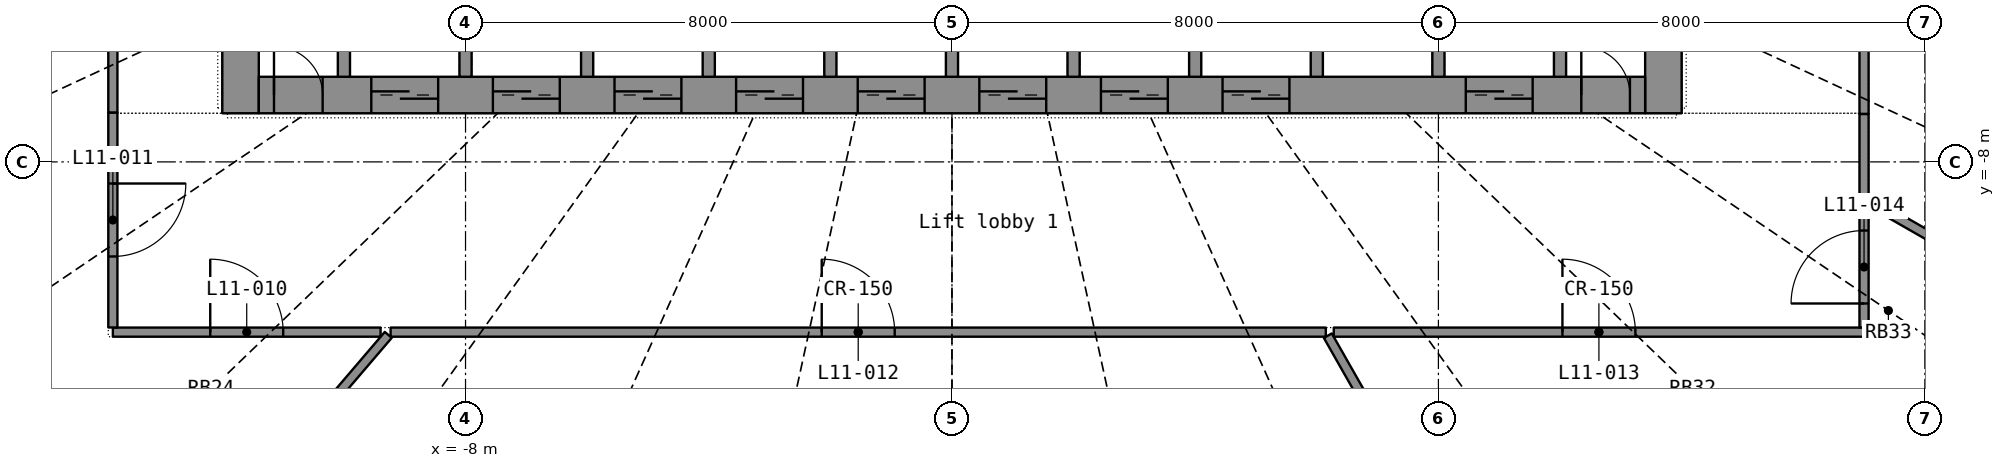
"""IFC4 building model, lengths in metres.
Left out: names, types, materials, properties, quantities, classifications, styles, units other than length and angle.
Written with IfcOpenShell. Run it as: python <this file> out.ifc"""

import sys

from ifc_helpers import new_model, si_unit, direction, frame, frame_2d, origin, place, context, subcontext, project, spatial, rectangle, extrude, element, fill, save


model = new_model("IFC4")
c1 = context("Model", 3, precision=1e-05, world=origin(), true_north=direction((0.0, 1.0)))
c2 = subcontext(c1, "Body", "Model", "MODEL_VIEW")
j1 = project(units=[si_unit("LENGTHUNIT", "METRE"), si_unit("PLANEANGLEUNIT", "RADIAN")], contexts=[c1])
p1 = place(None, origin())
s1 = spatial("IfcSite", under=j1, at=p1, CompositionType="ELEMENT")
p2 = place(p1, origin())
s2 = spatial("IfcBuilding", under=s1, at=p2, CompositionType="ELEMENT")
p3 = place(p2, frame((0.0, 0.0, 51.9)))
s3 = spatial("IfcBuildingStorey", under=s2, at=p3, CompositionType="ELEMENT", Elevation=51.9)
p4 = place(p3, frame((-11.7, -7.2, 0.0), z_axis=(0.0, 0.0, 1.0), x_axis=(0.0, 1.0, 0.0)))
e1 = element("IfcWall", 1, at=p4, inside=s3, PredefinedType="SHEAR", context=c2, shape_type="SweptSolid", body=[
    extrude(rectangle(XDim=14.4, YDim=0.6, at=frame_2d((7.2, 0.0))), origin(), (0.0, 0.0, 1.0), 3.3),
])
p5 = place(p4, frame((6.5, 0.0, 0.0)))
e2 = element("IfcOpeningElement", 2, at=p5, cuts=e1, PredefinedType="OPENING", context=c2, shape_type="SweptSolid", body=[
    extrude(rectangle(XDim=1.4, YDim=2.2, at=frame_2d((0.7, 1.1))), frame((0.0, 0.31, 0.0), z_axis=(0.0, -1.0, 0.0), x_axis=(1.0, 0.0, 0.0)), (0.0, 0.0, 1.0), 0.62),
])
p6 = place(p3, frame((11.7, -7.2, 0.0), z_axis=(0.0, 0.0, 1.0), x_axis=(0.0, 1.0, 0.0)))
e3 = element("IfcWall", 3, at=p6, inside=s3, PredefinedType="SHEAR", context=c2, shape_type="SweptSolid", body=[
    extrude(rectangle(XDim=14.4, YDim=0.6, at=frame_2d((7.2, 0.0))), origin(), (0.0, 0.0, 1.0), 3.3),
])
p7 = place(p6, frame((6.5, 0.0, 0.0)))
e4 = element("IfcOpeningElement", 4, at=p7, cuts=e3, PredefinedType="OPENING", context=c2, shape_type="SweptSolid", body=[
    extrude(rectangle(XDim=1.4, YDim=2.2, at=frame_2d((0.7, 1.1))), frame((0.0, 0.31, 0.0), z_axis=(0.0, -1.0, 0.0), x_axis=(1.0, 0.0, 0.0)), (0.0, 0.0, 1.0), 0.62),
])
p8 = place(p3, frame((-11.4, -6.9, 0.0), z_axis=(0.0, 0.0, 1.0), x_axis=(1.0, 0.0, 0.0)))
e5 = element("IfcWall", 5, at=p8, inside=s3, PredefinedType="SHEAR", context=c2, shape_type="SweptSolid", body=[
    extrude(rectangle(XDim=22.8, YDim=0.6, at=frame_2d((11.4, 0.0))), origin(), (0.0, 0.0, 1.0), 3.3),
])
p9 = place(p8, frame((1.85, 0.0, 0.0)))
e6 = element("IfcOpeningElement", 6, at=p9, cuts=e5, PredefinedType="OPENING", context=c2, shape_type="SweptSolid", body=[
    extrude(rectangle(XDim=1.1, YDim=2.2, at=frame_2d((0.55, 1.1))), frame((0.0, 0.31, 0.0), z_axis=(0.0, -1.0, 0.0), x_axis=(1.0, 0.0, 0.0)), (0.0, 0.0, 1.0), 0.62),
])
p10 = place(p8, frame((3.85, 0.0, 0.0)))
e7 = element("IfcOpeningElement", 7, at=p10, cuts=e5, PredefinedType="OPENING", context=c2, shape_type="SweptSolid", body=[
    extrude(rectangle(XDim=1.1, YDim=2.2, at=frame_2d((0.55, 1.1))), frame((0.0, 0.31, 0.0), z_axis=(0.0, -1.0, 0.0), x_axis=(1.0, 0.0, 0.0)), (0.0, 0.0, 1.0), 0.62),
])
p11 = place(p8, frame((5.85, 0.0, 0.0)))
e8 = element("IfcOpeningElement", 8, at=p11, cuts=e5, PredefinedType="OPENING", context=c2, shape_type="SweptSolid", body=[
    extrude(rectangle(XDim=1.1, YDim=2.2, at=frame_2d((0.55, 1.1))), frame((0.0, 0.31, 0.0), z_axis=(0.0, -1.0, 0.0), x_axis=(1.0, 0.0, 0.0)), (0.0, 0.0, 1.0), 0.62),
])
p12 = place(p8, frame((7.85, 0.0, 0.0)))
e9 = element("IfcOpeningElement", 9, at=p12, cuts=e5, PredefinedType="OPENING", context=c2, shape_type="SweptSolid", body=[
    extrude(rectangle(XDim=1.1, YDim=2.2, at=frame_2d((0.55, 1.1))), frame((0.0, 0.31, 0.0), z_axis=(0.0, -1.0, 0.0), x_axis=(1.0, 0.0, 0.0)), (0.0, 0.0, 1.0), 0.62),
])
p13 = place(p8, frame((9.85, 0.0, 0.0)))
e10 = element("IfcOpeningElement", 10, at=p13, cuts=e5, PredefinedType="OPENING", context=c2, shape_type="SweptSolid", body=[
    extrude(rectangle(XDim=1.1, YDim=2.2, at=frame_2d((0.55, 1.1))), frame((0.0, 0.31, 0.0), z_axis=(0.0, -1.0, 0.0), x_axis=(1.0, 0.0, 0.0)), (0.0, 0.0, 1.0), 0.62),
])
p14 = place(p8, frame((11.85, 0.0, 0.0)))
e11 = element("IfcOpeningElement", 11, at=p14, cuts=e5, PredefinedType="OPENING", context=c2, shape_type="SweptSolid", body=[
    extrude(rectangle(XDim=1.1, YDim=2.2, at=frame_2d((0.55, 1.1))), frame((0.0, 0.31, 0.0), z_axis=(0.0, -1.0, 0.0), x_axis=(1.0, 0.0, 0.0)), (0.0, 0.0, 1.0), 0.62),
])
p15 = place(p8, frame((13.85, 0.0, 0.0)))
e12 = element("IfcOpeningElement", 12, at=p15, cuts=e5, PredefinedType="OPENING", context=c2, shape_type="SweptSolid", body=[
    extrude(rectangle(XDim=1.1, YDim=2.2, at=frame_2d((0.55, 1.1))), frame((0.0, 0.31, 0.0), z_axis=(0.0, -1.0, 0.0), x_axis=(1.0, 0.0, 0.0)), (0.0, 0.0, 1.0), 0.62),
])
p16 = place(p8, frame((15.85, 0.0, 0.0)))
e13 = element("IfcOpeningElement", 13, at=p16, cuts=e5, PredefinedType="OPENING", context=c2, shape_type="SweptSolid", body=[
    extrude(rectangle(XDim=1.1, YDim=2.2, at=frame_2d((0.55, 1.1))), frame((0.0, 0.31, 0.0), z_axis=(0.0, -1.0, 0.0), x_axis=(1.0, 0.0, 0.0)), (0.0, 0.0, 1.0), 0.62),
])
p17 = place(p8, frame((19.85, 0.0, 0.0)))
e14 = element("IfcOpeningElement", 14, at=p17, cuts=e5, PredefinedType="OPENING", context=c2, shape_type="SweptSolid", body=[
    extrude(rectangle(XDim=1.1, YDim=2.2, at=frame_2d((0.55, 1.1))), frame((0.0, 0.31, 0.0), z_axis=(0.0, -1.0, 0.0), x_axis=(1.0, 0.0, 0.0)), (0.0, 0.0, 1.0), 0.62),
])
p18 = place(p8, frame((0.25, 0.0, 0.0)))
e15 = element("IfcOpeningElement", 15, at=p18, cuts=e5, PredefinedType="OPENING", context=c2, shape_type="SweptSolid", body=[
    extrude(rectangle(XDim=0.8, YDim=2.05, at=frame_2d((0.4, 1.025))), frame((0.0, 0.31, 0.0), z_axis=(0.0, -1.0, 0.0), x_axis=(1.0, 0.0, 0.0)), (0.0, 0.0, 1.0), 0.62),
])
p19 = place(p8, frame((21.75, 0.0, 0.0)))
e16 = element("IfcOpeningElement", 16, at=p19, cuts=e5, PredefinedType="OPENING", context=c2, shape_type="SweptSolid", body=[
    extrude(rectangle(XDim=0.8, YDim=2.05, at=frame_2d((0.4, 1.025))), frame((0.0, 0.31, 0.0), z_axis=(0.0, -1.0, 0.0), x_axis=(1.0, 0.0, 0.0)), (0.0, 0.0, 1.0), 0.62),
])
for number, where, z_axis, x_axis in (
    (17, (-10.0, -6.6, 0.0), (0.0, 0.0, 1.0), (0.0, 1.0, 0.0)),
    (18, (-8.0, -6.6, 0.0), (0.0, 0.0, 1.0), (0.0, 1.0, 0.0)),
    (19, (-6.0, -6.6, 0.0), (0.0, 0.0, 1.0), (0.0, 1.0, 0.0)),
    (20, (-4.0, -6.6, 0.0), (0.0, 0.0, 1.0), (0.0, 1.0, 0.0)),
    (21, (-2.0, -6.6, 0.0), (0.0, 0.0, 1.0), (0.0, 1.0, 0.0)),
    (22, (0.0, -6.6, 0.0), (0.0, 0.0, 1.0), (0.0, 1.0, 0.0)),
    (23, (2.0, -6.6, 0.0), (0.0, 0.0, 1.0), (0.0, 1.0, 0.0)),
    (24, (4.0, -6.6, 0.0), (0.0, 0.0, 1.0), (0.0, 1.0, 0.0)),
    (25, (6.0, -6.6, 0.0), (0.0, 0.0, 1.0), (0.0, 1.0, 0.0)),
    (26, (8.0, -6.6, 0.0), (0.0, 0.0, 1.0), (0.0, 1.0, 0.0)),
    (27, (10.0, -6.6, 0.0), (0.0, 0.0, 1.0), (0.0, 1.0, 0.0)),
):
    element("IfcWall", number, at=place(p3, frame(where, z_axis=z_axis, x_axis=x_axis)), inside=s3, PredefinedType="SHEAR", context=c2, shape_type="SweptSolid", body=[
        extrude(rectangle(XDim=2.7, YDim=0.2, at=frame_2d((1.35, 0.0))), origin(), (0.0, 0.0, 1.0), 3.3),
    ])
p20 = place(p3, frame((-9.232, -10.8, 0.0), z_axis=(0.0, 0.0, 1.0), x_axis=(1.0, 0.0, 0.0)))
e28 = element("IfcWall", 28, at=p20, inside=s3, PredefinedType="PARTITIONING", context=c2, shape_type="SweptSolid", body=[
    extrude(rectangle(XDim=15.381, YDim=0.15, at=frame_2d((7.69, 0.0))), origin(), (0.0, 0.0, 1.0), 2.4),
])
p21 = place(p20, frame((7.09, 0.0, 0.0)))
e29 = element("IfcOpeningElement", 29, at=p21, cuts=e28, PredefinedType="OPENING", context=c2, shape_type="SweptSolid", body=[
    extrude(rectangle(XDim=1.2, YDim=2.2, at=frame_2d((0.6, 1.1))), frame((0.0, 0.085, 0.0), z_axis=(0.0, -1.0, 0.0), x_axis=(1.0, 0.0, 0.0)), (0.0, 0.0, 1.0), 0.17),
])
p22 = place(p3, frame((-24.974, -9.539, 0.0), z_axis=(0.0, 0.0, 1.0), x_axis=(0.934173736, 0.356818485, 0.0)))
e30 = element("IfcWall", 30, at=p22, inside=s3, PredefinedType="PARTITIONING", context=c2, shape_type="SweptSolid", body=[
    extrude(rectangle(XDim=11.961, YDim=0.15, at=frame_2d((5.981, 0.0))), origin(), (0.0, 0.0, 1.0), 2.4),
])
p23 = place(p3, frame((11.638, -20.444, 0.0), z_axis=(0.0, 0.0, 1.0), x_axis=(-0.494736706, 0.869042917, 0.0)))
e31 = element("IfcWall", 31, at=p23, inside=s3, PredefinedType="PARTITIONING", context=c2, shape_type="SweptSolid", body=[
    extrude(rectangle(XDim=11.03, YDim=0.15, at=frame_2d((5.515, 0.0))), origin(), (0.0, 0.0, 1.0), 2.4),
])
p24 = place(p3, frame((-15.798, -18.48, 0.0), z_axis=(0.0, 0.0, 1.0), x_axis=(0.649794059, 0.760110308, 0.0)))
e32 = element("IfcWall", 32, at=p24, inside=s3, PredefinedType="PARTITIONING", context=c2, shape_type="SweptSolid", body=[
    extrude(rectangle(XDim=10.045, YDim=0.15, at=frame_2d((5.022, 0.0))), origin(), (0.0, 0.0, 1.0), 2.4),
])
p25 = place(p3, frame((6.279, -10.8, 0.0), z_axis=(0.0, 0.0, 1.0), x_axis=(1.0, 0.0, 0.0)))
e33 = element("IfcWall", 33, at=p25, inside=s3, PredefinedType="PARTITIONING", context=c2, shape_type="SweptSolid", body=[
    extrude(rectangle(XDim=8.721, YDim=0.15, at=frame_2d((4.36, 0.0))), origin(), (0.0, 0.0, 1.0), 2.4),
])
p26 = place(p25, frame((3.76, 0.0, 0.0)))
e34 = element("IfcOpeningElement", 34, at=p26, cuts=e33, PredefinedType="OPENING", context=c2, shape_type="SweptSolid", body=[
    extrude(rectangle(XDim=1.2, YDim=2.2, at=frame_2d((0.6, 1.1))), frame((0.0, 0.085, 0.0), z_axis=(0.0, -1.0, 0.0), x_axis=(1.0, 0.0, 0.0)), (0.0, 0.0, 1.0), 0.17),
])
p27 = place(p3, frame((22.571, -12.945, 0.0), z_axis=(0.0, 0.0, 1.0), x_axis=(-0.867458802, 0.497509022, 0.0)))
e35 = element("IfcWall", 35, at=p27, inside=s3, PredefinedType="PARTITIONING", context=c2, shape_type="SweptSolid", body=[
    extrude(rectangle(XDim=8.728, YDim=0.15, at=frame_2d((4.364, 0.0))), origin(), (0.0, 0.0, 1.0), 2.4),
])
p28 = place(p3, frame((15.0, -7.212, 0.0), z_axis=(0.0, 0.0, 1.0), x_axis=(0.0, 1.0, 0.0)))
e36 = element("IfcWall", 36, at=p28, inside=s3, PredefinedType="PARTITIONING", context=c2, shape_type="SweptSolid", body=[
    extrude(rectangle(XDim=6.054, YDim=0.15, at=frame_2d((3.027, 0.0))), origin(), (0.0, 0.0, 1.0), 2.4),
])
p29 = place(p28, frame((2.427, 0.0, 0.0)))
e37 = element("IfcOpeningElement", 37, at=p29, cuts=e36, PredefinedType="OPENING", context=c2, shape_type="SweptSolid", body=[
    extrude(rectangle(XDim=1.2, YDim=2.2, at=frame_2d((0.6, 1.1))), frame((0.0, 0.085, 0.0), z_axis=(0.0, -1.0, 0.0), x_axis=(1.0, 0.0, 0.0)), (0.0, 0.0, 1.0), 0.17),
])
p30 = place(p3, frame((-13.8, -10.8, 0.0), z_axis=(0.0, 0.0, 1.0), x_axis=(1.0, 0.0, 0.0)))
e38 = element("IfcWall", 38, at=p30, inside=s3, PredefinedType="PARTITIONING", context=c2, shape_type="SweptSolid", body=[
    extrude(rectangle(XDim=4.403, YDim=0.15, at=frame_2d((2.202, 0.0))), origin(), (0.0, 0.0, 1.0), 2.4),
])
p31 = place(p30, frame((1.602, 0.0, 0.0)))
e39 = element("IfcOpeningElement", 39, at=p31, cuts=e38, PredefinedType="OPENING", context=c2, shape_type="SweptSolid", body=[
    extrude(rectangle(XDim=1.2, YDim=2.2, at=frame_2d((0.6, 1.1))), frame((0.0, 0.085, 0.0), z_axis=(0.0, -1.0, 0.0), x_axis=(1.0, 0.0, 0.0)), (0.0, 0.0, 1.0), 0.17),
])
p32 = place(p3, frame((-13.8, -7.188, 0.0), z_axis=(0.0, 0.0, 1.0), x_axis=(0.0, -1.0, 0.0)))
e40 = element("IfcWall", 40, at=p32, inside=s3, PredefinedType="PARTITIONING", context=c2, shape_type="SweptSolid", body=[
    extrude(rectangle(XDim=3.535, YDim=0.15, at=frame_2d((1.768, 0.0))), origin(), (0.0, 0.0, 1.0), 2.4),
])
p33 = place(p32, frame((1.167, 0.0, 0.0)))
e41 = element("IfcOpeningElement", 41, at=p33, cuts=e40, PredefinedType="OPENING", context=c2, shape_type="SweptSolid", body=[
    extrude(rectangle(XDim=1.2, YDim=2.2, at=frame_2d((0.6, 1.1))), frame((0.0, 0.085, 0.0), z_axis=(0.0, -1.0, 0.0), x_axis=(1.0, 0.0, 0.0)), (0.0, 0.0, 1.0), 0.17),
])
p34 = place(p3, frame((15.0, -10.723, 0.0), z_axis=(0.0, 0.0, 1.0), x_axis=(0.0, 1.0, 0.0)))
e42 = element("IfcWall", 42, at=p34, inside=s3, PredefinedType="PARTITIONING", context=c2, shape_type="SweptSolid", body=[
    extrude(rectangle(XDim=1.988, YDim=0.15, at=frame_2d((0.994, 0.0))), origin(), (0.0, 0.0, 1.0), 2.4),
])
p35 = place(p34, frame((0.394, 0.0, 0.0)))
e43 = element("IfcOpeningElement", 43, at=p35, cuts=e42, PredefinedType="OPENING", context=c2, shape_type="SweptSolid", body=[
    extrude(rectangle(XDim=1.2, YDim=2.2, at=frame_2d((0.6, 1.1))), frame((0.0, 0.085, 0.0), z_axis=(0.0, -1.0, 0.0), x_axis=(1.0, 0.0, 0.0)), (0.0, 0.0, 1.0), 0.17),
])
p36 = place(p3, frame((-13.8, -5.382, 0.0), z_axis=(0.0, 0.0, 1.0), x_axis=(0.0, -1.0, 0.0)))
e44 = element("IfcWall", 44, at=p36, inside=s3, PredefinedType="PARTITIONING", context=c2, shape_type="SweptSolid", body=[
    extrude(rectangle(XDim=1.805, YDim=0.15, at=frame_2d((0.902, 0.0))), origin(), (0.0, 0.0, 1.0), 2.4),
])
p37 = place(p3, frame((15.0, -8.536, 0.0), z_axis=(0.0, 0.0, 1.0), x_axis=(0.0, 1.0, 0.0)))
e45 = element("IfcWall", 45, at=p37, inside=s3, PredefinedType="PARTITIONING", context=c2, shape_type="SweptSolid", body=[
    extrude(rectangle(XDim=1.323, YDim=0.15, at=frame_2d((0.662, 0.0))), origin(), (0.0, 0.0, 1.0), 2.4),
])
p38 = place(p9, origin())
e46 = element("IfcDoor", 46, at=p38, inside=s3, OperationType="DOUBLE_DOOR_SLIDING", PredefinedType="DOOR", context=c2, shape_type="SweptSolid", body=[
    extrude(rectangle(XDim=1.1, YDim=2.2, at=frame_2d((0.55, 1.1))), frame((0.0, 0.025, 0.0), z_axis=(0.0, -1.0, 0.0), x_axis=(1.0, 0.0, 0.0)), (0.0, 0.0, 1.0), 0.05),
])
fill(e6, e46)
p39 = place(p10, origin())
e47 = element("IfcDoor", 47, at=p39, inside=s3, OperationType="DOUBLE_DOOR_SLIDING", PredefinedType="DOOR", context=c2, shape_type="SweptSolid", body=[
    extrude(rectangle(XDim=1.1, YDim=2.2, at=frame_2d((0.55, 1.1))), frame((0.0, 0.025, 0.0), z_axis=(0.0, -1.0, 0.0), x_axis=(1.0, 0.0, 0.0)), (0.0, 0.0, 1.0), 0.05),
])
fill(e7, e47)
p40 = place(p11, origin())
e48 = element("IfcDoor", 48, at=p40, inside=s3, OperationType="DOUBLE_DOOR_SLIDING", PredefinedType="DOOR", context=c2, shape_type="SweptSolid", body=[
    extrude(rectangle(XDim=1.1, YDim=2.2, at=frame_2d((0.55, 1.1))), frame((0.0, 0.025, 0.0), z_axis=(0.0, -1.0, 0.0), x_axis=(1.0, 0.0, 0.0)), (0.0, 0.0, 1.0), 0.05),
])
fill(e8, e48)
p41 = place(p12, origin())
e49 = element("IfcDoor", 49, at=p41, inside=s3, OperationType="DOUBLE_DOOR_SLIDING", PredefinedType="DOOR", context=c2, shape_type="SweptSolid", body=[
    extrude(rectangle(XDim=1.1, YDim=2.2, at=frame_2d((0.55, 1.1))), frame((0.0, 0.025, 0.0), z_axis=(0.0, -1.0, 0.0), x_axis=(1.0, 0.0, 0.0)), (0.0, 0.0, 1.0), 0.05),
])
fill(e9, e49)
p42 = place(p13, origin())
e50 = element("IfcDoor", 50, at=p42, inside=s3, OperationType="DOUBLE_DOOR_SLIDING", PredefinedType="DOOR", context=c2, shape_type="SweptSolid", body=[
    extrude(rectangle(XDim=1.1, YDim=2.2, at=frame_2d((0.55, 1.1))), frame((0.0, 0.025, 0.0), z_axis=(0.0, -1.0, 0.0), x_axis=(1.0, 0.0, 0.0)), (0.0, 0.0, 1.0), 0.05),
])
fill(e10, e50)
p43 = place(p14, origin())
e51 = element("IfcDoor", 51, at=p43, inside=s3, OperationType="DOUBLE_DOOR_SLIDING", PredefinedType="DOOR", context=c2, shape_type="SweptSolid", body=[
    extrude(rectangle(XDim=1.1, YDim=2.2, at=frame_2d((0.55, 1.1))), frame((0.0, 0.025, 0.0), z_axis=(0.0, -1.0, 0.0), x_axis=(1.0, 0.0, 0.0)), (0.0, 0.0, 1.0), 0.05),
])
fill(e11, e51)
p44 = place(p15, origin())
e52 = element("IfcDoor", 52, at=p44, inside=s3, OperationType="DOUBLE_DOOR_SLIDING", PredefinedType="DOOR", context=c2, shape_type="SweptSolid", body=[
    extrude(rectangle(XDim=1.1, YDim=2.2, at=frame_2d((0.55, 1.1))), frame((0.0, 0.025, 0.0), z_axis=(0.0, -1.0, 0.0), x_axis=(1.0, 0.0, 0.0)), (0.0, 0.0, 1.0), 0.05),
])
fill(e12, e52)
p45 = place(p16, origin())
e53 = element("IfcDoor", 53, at=p45, inside=s3, OperationType="DOUBLE_DOOR_SLIDING", PredefinedType="DOOR", context=c2, shape_type="SweptSolid", body=[
    extrude(rectangle(XDim=1.1, YDim=2.2, at=frame_2d((0.55, 1.1))), frame((0.0, 0.025, 0.0), z_axis=(0.0, -1.0, 0.0), x_axis=(1.0, 0.0, 0.0)), (0.0, 0.0, 1.0), 0.05),
])
fill(e13, e53)
p46 = place(p17, origin())
e54 = element("IfcDoor", 54, at=p46, inside=s3, OperationType="DOUBLE_DOOR_SLIDING", PredefinedType="DOOR", context=c2, shape_type="SweptSolid", body=[
    extrude(rectangle(XDim=1.1, YDim=2.2, at=frame_2d((0.55, 1.1))), frame((0.0, 0.025, 0.0), z_axis=(0.0, -1.0, 0.0), x_axis=(1.0, 0.0, 0.0)), (0.0, 0.0, 1.0), 0.05),
])
fill(e14, e54)
p47 = place(p18, origin())
e55 = element("IfcDoor", 55, at=p47, inside=s3, OperationType="SINGLE_SWING_LEFT", PredefinedType="DOOR", context=c2, shape_type="SweptSolid", body=[
    extrude(rectangle(XDim=0.8, YDim=2.05, at=frame_2d((0.4, 1.025))), frame((0.0, 0.025, 0.0), z_axis=(0.0, -1.0, 0.0), x_axis=(1.0, 0.0, 0.0)), (0.0, 0.0, 1.0), 0.05),
])
fill(e15, e55)
p48 = place(p19, origin())
e56 = element("IfcDoor", 56, at=p48, inside=s3, OperationType="SINGLE_SWING_LEFT", PredefinedType="DOOR", context=c2, shape_type="SweptSolid", body=[
    extrude(rectangle(XDim=0.8, YDim=2.05, at=frame_2d((0.4, 1.025))), frame((0.0, 0.025, 0.0), z_axis=(0.0, -1.0, 0.0), x_axis=(1.0, 0.0, 0.0)), (0.0, 0.0, 1.0), 0.05),
])
fill(e16, e56)
p49 = place(p31, origin())
e57 = element("IfcDoor", 57, at=p49, inside=s3, OperationType="DOUBLE_DOOR_SINGLE_SWING", PredefinedType="DOOR", context=c2, shape_type="SweptSolid", body=[
    extrude(rectangle(XDim=1.2, YDim=2.2, at=frame_2d((0.6, 1.1))), frame((0.0, 0.025, 0.0), z_axis=(0.0, -1.0, 0.0), x_axis=(1.0, 0.0, 0.0)), (0.0, 0.0, 1.0), 0.05),
])
fill(e39, e57)
p50 = place(p33, origin())
e58 = element("IfcDoor", 58, at=p50, inside=s3, OperationType="DOUBLE_DOOR_SINGLE_SWING", PredefinedType="DOOR", context=c2, shape_type="SweptSolid", body=[
    extrude(rectangle(XDim=1.2, YDim=2.2, at=frame_2d((0.6, 1.1))), frame((0.0, 0.025, 0.0), z_axis=(0.0, -1.0, 0.0), x_axis=(1.0, 0.0, 0.0)), (0.0, 0.0, 1.0), 0.05),
])
fill(e41, e58)
p51 = place(p21, origin())
e59 = element("IfcDoor", 59, at=p51, inside=s3, OperationType="DOUBLE_DOOR_SINGLE_SWING", PredefinedType="DOOR", context=c2, shape_type="SweptSolid", body=[
    extrude(rectangle(XDim=1.2, YDim=2.2, at=frame_2d((0.6, 1.1))), frame((0.0, 0.025, 0.0), z_axis=(0.0, -1.0, 0.0), x_axis=(1.0, 0.0, 0.0)), (0.0, 0.0, 1.0), 0.05),
])
fill(e29, e59)
p52 = place(p26, origin())
e60 = element("IfcDoor", 60, at=p52, inside=s3, OperationType="DOUBLE_DOOR_SINGLE_SWING", PredefinedType="DOOR", context=c2, shape_type="SweptSolid", body=[
    extrude(rectangle(XDim=1.2, YDim=2.2, at=frame_2d((0.6, 1.1))), frame((0.0, 0.025, 0.0), z_axis=(0.0, -1.0, 0.0), x_axis=(1.0, 0.0, 0.0)), (0.0, 0.0, 1.0), 0.05),
])
fill(e34, e60)
p53 = place(p35, origin())
e61 = element("IfcDoor", 61, at=p53, inside=s3, OperationType="DOUBLE_DOOR_SINGLE_SWING", PredefinedType="DOOR", context=c2, shape_type="SweptSolid", body=[
    extrude(rectangle(XDim=1.2, YDim=2.2, at=frame_2d((0.6, 1.1))), frame((0.0, 0.025, 0.0), z_axis=(0.0, -1.0, 0.0), x_axis=(1.0, 0.0, 0.0)), (0.0, 0.0, 1.0), 0.05),
])
fill(e43, e61)
save(model, sys.argv[1])
